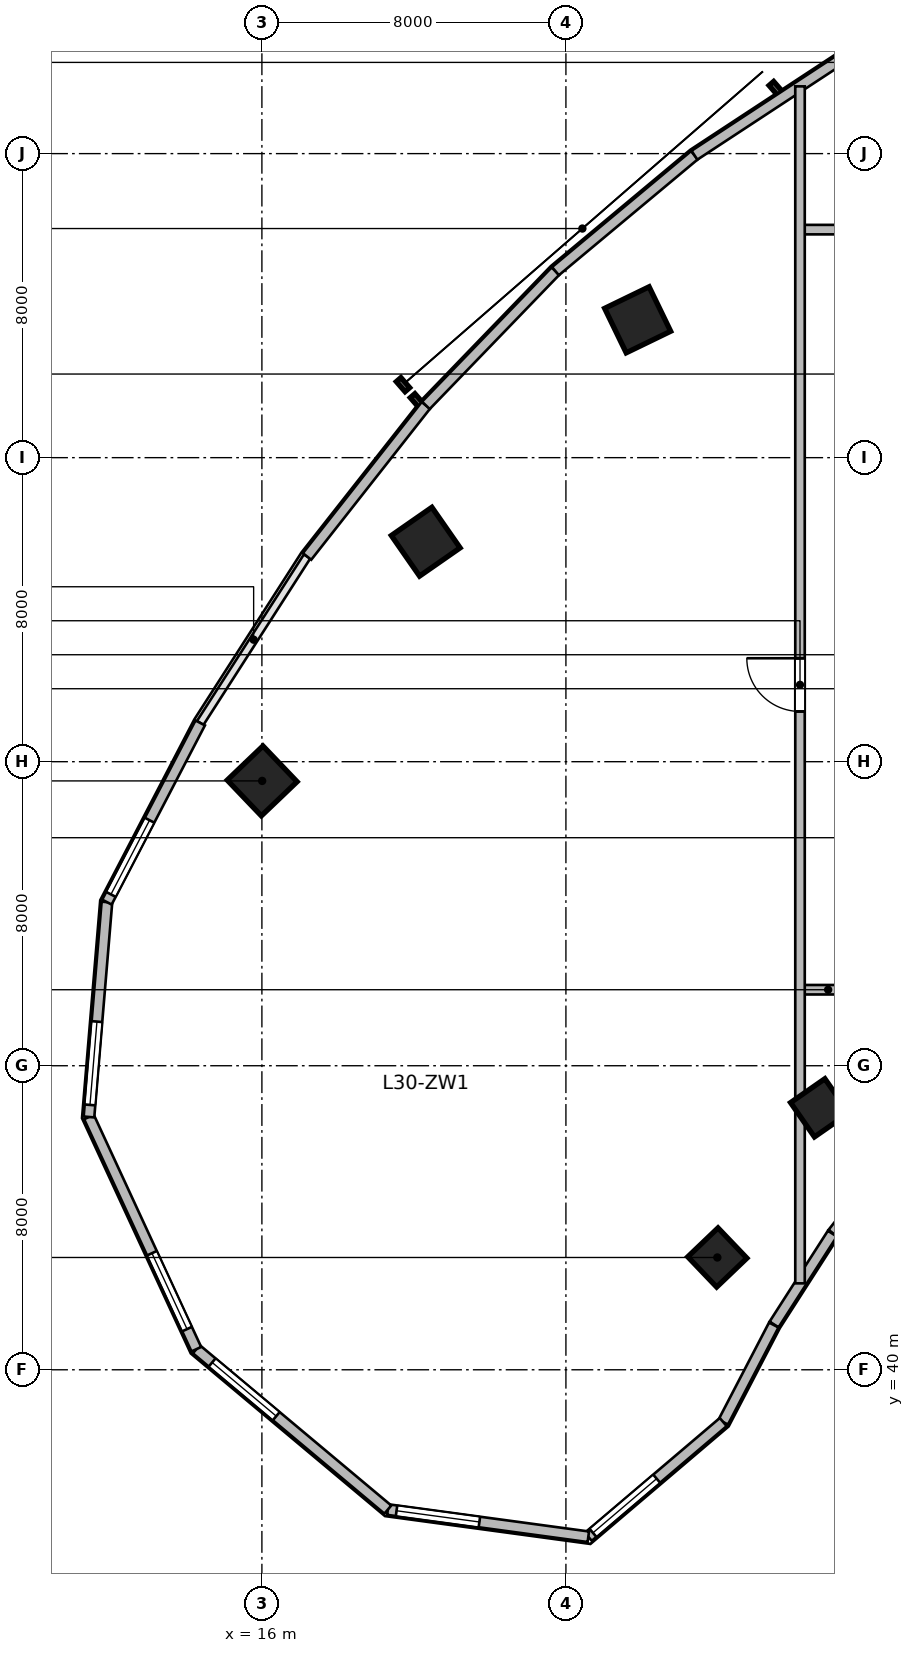
"""IFC4 building model, lengths in metres.
Left out: names, types, materials, properties, quantities, classifications, styles, units other than length and angle.
Written with IfcOpenShell. Run it as: python <this file> out.ifc"""

import sys

from ifc_helpers import new_model, si_unit, direction, frame, frame_2d, origin, origin_2d, place, context, subcontext, project, spatial, rectangle, extrude, source, transform, mapped, element, fill, save


model = new_model("IFC4")
c1 = context("Model", 3, precision=1e-05, world=origin(), true_north=direction((0.0, 1.0)))
c2 = subcontext(c1, "Body", "Model", "MODEL_VIEW")
j1 = project(units=[si_unit("LENGTHUNIT", "METRE"), si_unit("PLANEANGLEUNIT", "RADIAN")], contexts=[c1])
p1 = place(None, origin())
s1 = spatial("IfcSite", under=j1, at=p1, CompositionType="ELEMENT")
p2 = place(p1, origin())
s2 = spatial("IfcBuilding", under=s1, at=p2, CompositionType="ELEMENT")
p3 = place(p2, frame((0.0, 0.0, 127.2)))
s3 = spatial("IfcBuildingStorey", under=s2, at=p3, CompositionType="ELEMENT", Elevation=127.2)
m1 = source(origin(), c2, "Body", "SweptSolid", [
    extrude(rectangle(XDim=1.1, YDim=1.1, at=origin_2d()), origin(), (0.0, 0.0, 1.0), 3.9),
])
p4 = place(p3, frame((27.985, 42.955, 0.0), z_axis=(0.0, 0.0, 1.0), x_axis=(-0.690756218984, 0.723087716626, 0.0)))
e1 = element("IfcColumn", 1, at=p4, inside=s3, PredefinedType="COLUMN", context=c2, shape_type="MappedRepresentation", body=[
    mapped(m1, transform((0.0, 0.0, 0.0), scale=1.0)),
])
m2 = source(origin(), c2, "Body", "SweptSolid", [
    extrude(rectangle(XDim=1.3, YDim=1.3, at=origin_2d()), origin(), (0.0, 0.0, 1.0), 3.9),
])
p5 = place(p3, frame((16.007, 55.494, 0.0), z_axis=(0.0, 0.0, 1.0), x_axis=(-0.690756218984, 0.723087716626, 0.0)))
e2 = element("IfcColumn", 2, at=p5, inside=s3, PredefinedType="COLUMN", context=c2, shape_type="MappedRepresentation", body=[
    mapped(m2, transform((0.0, 0.0, 0.0), scale=1.0)),
])
p6 = place(p3, frame((30.677, 46.892, 0.0), z_axis=(0.0, 0.0, 1.0), x_axis=(-0.571143442153, 0.820850271661, 0.0)))
e3 = element("IfcColumn", 3, at=p6, inside=s3, PredefinedType="COLUMN", context=c2, shape_type="MappedRepresentation", body=[
    mapped(m1, transform((0.0, 0.0, 0.0), scale=1.0)),
])
for number, where, z_axis, x_axis in (
    (4, (20.311, 61.789, 0.0), (0.0, 0.0, 1.0), (-0.571, 0.821, 0.0)),
    (5, (25.888, 67.627, 0.0), (0.0, 0.0, 1.0), (-0.436, 0.9, 0.0)),
):
    element("IfcColumn", number, at=place(p3, frame(where, z_axis=z_axis, x_axis=x_axis)), inside=s3, PredefinedType="COLUMN", context=c2, shape_type="MappedRepresentation", body=[
        mapped(m2, transform((0.0, 0.0, 0.0), scale=1.0)),
    ])
m3 = source(origin(), c2, "Body", "SweptSolid", [
    extrude(rectangle(XDim=2.76, YDim=0.28, at=frame_2d((1.38, 0.0))), origin(), (0.0, 0.0, 1.0), 3.65),
])
p7 = place(p3, frame((32.728, 45.766, 0.0), z_axis=(0.0, 0.0, 1.0), x_axis=(-0.618180818641, -0.786035925047, 0.0)))
e6 = element("IfcWall", 6, at=p7, inside=s3, PredefinedType="SOLIDWALL", context=c2, shape_type="MappedRepresentation", body=[
    mapped(m3, transform((0.0, 0.0, 0.0), scale=1.0)),
])
m4 = source(origin(), c2, "Body", "SweptSolid", [
    extrude(rectangle(XDim=2.84, YDim=0.28, at=frame_2d((1.42, 0.0))), origin(), (0.0, 0.0, 1.0), 3.65),
])
p8 = place(p3, frame((31.011, 43.582, 0.0), z_axis=(0.0, 0.0, 1.0), x_axis=(-0.540214368057, -0.841527442538, 0.0)))
e7 = element("IfcWall", 7, at=p8, inside=s3, PredefinedType="SOLIDWALL", context=c2, shape_type="MappedRepresentation", body=[
    mapped(m4, transform((0.0, 0.0, 0.0), scale=1.0)),
])
m5 = source(origin(), c2, "Body", "SweptSolid", [
    extrude(rectangle(XDim=2.88, YDim=0.28, at=frame_2d((1.44, 0.0))), origin(), (0.0, 0.0, 1.0), 3.65),
])
p9 = place(p3, frame((29.469, 41.178, 0.0), z_axis=(0.0, 0.0, 1.0), x_axis=(-0.461769086658, -0.887000175088, 0.0)))
e8 = element("IfcWall", 8, at=p9, inside=s3, PredefinedType="SOLIDWALL", context=c2, shape_type="MappedRepresentation", body=[
    mapped(m5, transform((0.0, 0.0, 0.0), scale=1.0)),
])
m6 = source(origin(), c2, "Body", "SweptSolid", [
    extrude(rectangle(XDim=4.659, YDim=0.28, at=frame_2d((2.33, 0.0))), origin(), (0.0, 0.0, 1.0), 3.65),
])
p10 = place(p3, frame((28.139, 38.624, 0.0), z_axis=(0.0, 0.0, 1.0), x_axis=(-0.761913458795, -0.647678841176, 0.0)))
e9 = element("IfcWall", 9, at=p10, inside=s3, PredefinedType="SOLIDWALL", context=c2, shape_type="MappedRepresentation", body=[
    mapped(m6, transform((0.0, 0.0, 0.0), scale=1.0)),
])
p11 = place(p10, frame((2.299, 0.0, 0.95)))
e10 = element("IfcOpeningElement", 10, at=p11, cuts=e9, PredefinedType="OPENING", context=c2, shape_type="SweptSolid", body=[
    extrude(rectangle(XDim=2.2, YDim=2.1, at=frame_2d((1.1, 1.05))), frame((0.0, 0.15, 0.0), z_axis=(0.0, -1.0, 0.0), x_axis=(1.0, 0.0, 0.0)), (0.0, 0.0, 1.0), 0.3),
])
m7 = source(origin(), c2, "Body", "SweptSolid", [
    extrude(rectangle(XDim=5.324, YDim=0.28, at=frame_2d((2.662, 0.0))), origin(), (0.0, 0.0, 1.0), 3.65),
])
p12 = place(p3, frame((24.59, 35.606, 0.0), z_axis=(0.0, 0.0, 1.0), x_axis=(-0.990931467223, 0.134368252451, 0.0)))
e11 = element("IfcWall", 11, at=p12, inside=s3, PredefinedType="SOLIDWALL", context=c2, shape_type="MappedRepresentation", body=[
    mapped(m7, transform((0.0, 0.0, 0.0), scale=1.0)),
])
p13 = place(p12, frame((2.893, 0.0, 0.95)))
e12 = element("IfcOpeningElement", 12, at=p13, cuts=e11, PredefinedType="OPENING", context=c2, shape_type="SweptSolid", body=[
    extrude(rectangle(XDim=2.2, YDim=2.1, at=frame_2d((1.1, 1.05))), frame((0.0, 0.15, 0.0), z_axis=(0.0, -1.0, 0.0), x_axis=(1.0, 0.0, 0.0)), (0.0, 0.0, 1.0), 0.3),
])
m8 = source(origin(), c2, "Body", "SweptSolid", [
    extrude(rectangle(XDim=6.573, YDim=0.28, at=frame_2d((3.287, 0.0))), origin(), (0.0, 0.0, 1.0), 3.65),
])
p14 = place(p3, frame((19.314, 36.322, 0.0), z_axis=(0.0, 0.0, 1.0), x_axis=(-0.766715154163, 0.641987439423, 0.0)))
e13 = element("IfcWall", 13, at=p14, inside=s3, PredefinedType="SOLIDWALL", context=c2, shape_type="MappedRepresentation", body=[
    mapped(m8, transform((0.0, 0.0, 0.0), scale=1.0)),
])
p15 = place(p14, frame((3.83, 0.0, 0.95)))
e14 = element("IfcOpeningElement", 14, at=p15, cuts=e13, PredefinedType="OPENING", context=c2, shape_type="SweptSolid", body=[
    extrude(rectangle(XDim=2.2, YDim=2.1, at=frame_2d((1.1, 1.05))), frame((0.0, 0.15, 0.0), z_axis=(0.0, -1.0, 0.0), x_axis=(1.0, 0.0, 0.0)), (0.0, 0.0, 1.0), 0.3),
])
m9 = source(origin(), c2, "Body", "SweptSolid", [
    extrude(rectangle(XDim=6.732, YDim=0.28, at=frame_2d((3.366, 0.0))), origin(), (0.0, 0.0, 1.0), 3.65),
])
p16 = place(p3, frame((14.275, 40.541, 0.0), z_axis=(0.0, 0.0, 1.0), x_axis=(-0.419644552709, 0.907688520023, 0.0)))
e15 = element("IfcWall", 15, at=p16, inside=s3, PredefinedType="SOLIDWALL", context=c2, shape_type="MappedRepresentation", body=[
    mapped(m9, transform((0.0, 0.0, 0.0), scale=1.0)),
])
p17 = place(p16, frame((0.583, 0.0, 0.95)))
e16 = element("IfcOpeningElement", 16, at=p17, cuts=e15, PredefinedType="OPENING", context=c2, shape_type="SweptSolid", body=[
    extrude(rectangle(XDim=2.2, YDim=2.1, at=frame_2d((1.1, 1.05))), frame((0.0, 0.15, 0.0), z_axis=(0.0, -1.0, 0.0), x_axis=(1.0, 0.0, 0.0)), (0.0, 0.0, 1.0), 0.3),
])
m10 = source(origin(), c2, "Body", "SweptSolid", [
    extrude(rectangle(XDim=5.674, YDim=0.28, at=frame_2d((2.837, 0.0))), origin(), (0.0, 0.0, 1.0), 3.65),
])
p18 = place(p3, frame((11.45, 46.652, 0.0), z_axis=(0.0, 0.0, 1.0), x_axis=(0.083309007867, 0.996523762491, 0.0)))
e17 = element("IfcWall", 17, at=p18, inside=s3, PredefinedType="SOLIDWALL", context=c2, shape_type="MappedRepresentation", body=[
    mapped(m10, transform((0.0, 0.0, 0.0), scale=1.0)),
])
p19 = place(p18, frame((0.318, 0.0, 0.95)))
e18 = element("IfcOpeningElement", 18, at=p19, cuts=e17, PredefinedType="OPENING", context=c2, shape_type="SweptSolid", body=[
    extrude(rectangle(XDim=2.2, YDim=2.1, at=frame_2d((1.1, 1.05))), frame((0.0, 0.15, 0.0), z_axis=(0.0, -1.0, 0.0), x_axis=(1.0, 0.0, 0.0)), (0.0, 0.0, 1.0), 0.3),
])
m11 = source(origin(), c2, "Body", "SweptSolid", [
    extrude(rectangle(XDim=5.315, YDim=0.28, at=frame_2d((2.658, 0.0))), origin(), (0.0, 0.0, 1.0), 3.65),
])
p20 = place(p3, frame((11.922, 52.305, 0.0), z_axis=(0.0, 0.0, 1.0), x_axis=(0.461760527822, 0.887004630735, 0.0)))
e19 = element("IfcWall", 19, at=p20, inside=s3, PredefinedType="SOLIDWALL", context=c2, shape_type="MappedRepresentation", body=[
    mapped(m11, transform((0.0, 0.0, 0.0), scale=1.0)),
])
p21 = place(p20, frame((0.229, 0.0, 0.95)))
e20 = element("IfcOpeningElement", 20, at=p21, cuts=e19, PredefinedType="OPENING", context=c2, shape_type="SweptSolid", body=[
    extrude(rectangle(XDim=2.2, YDim=2.1, at=frame_2d((1.1, 1.05))), frame((0.0, 0.15, 0.0), z_axis=(0.0, -1.0, 0.0), x_axis=(1.0, 0.0, 0.0)), (0.0, 0.0, 1.0), 0.3),
])
m12 = source(origin(), c2, "Body", "SweptSolid", [
    extrude(rectangle(XDim=5.058, YDim=0.28, at=frame_2d((2.529, 0.0))), origin(), (0.0, 0.0, 1.0), 3.65),
])
p22 = place(p3, frame((17.188, 61.4, 0.0), z_axis=(0.0, 0.0, 1.0), x_axis=(0.618145507434, 0.786063694391, 0.0)))
e21 = element("IfcWall", 21, at=p22, inside=s3, PredefinedType="SOLIDWALL", context=c2, shape_type="MappedRepresentation", body=[
    mapped(m12, transform((0.0, 0.0, 0.0), scale=1.0)),
])
m13 = source(origin(), c2, "Body", "SweptSolid", [
    extrude(rectangle(XDim=4.908, YDim=0.28, at=frame_2d((2.454, 0.0))), origin(), (0.0, 0.0, 1.0), 3.65),
])
p23 = place(p3, frame((20.315, 65.376, 0.0), z_axis=(0.0, 0.0, 1.0), x_axis=(0.694613154328, 0.719383462302, 0.0)))
e22 = element("IfcWall", 22, at=p23, inside=s3, PredefinedType="SOLIDWALL", context=c2, shape_type="MappedRepresentation", body=[
    mapped(m13, transform((0.0, 0.0, 0.0), scale=1.0)),
])
m14 = source(origin(), c2, "Body", "SweptSolid", [
    extrude(rectangle(XDim=4.762, YDim=0.28, at=frame_2d((2.381, 0.0))), origin(), (0.0, 0.0, 1.0), 3.65),
])
p24 = place(p3, frame((23.725, 68.907, 0.0), z_axis=(0.0, 0.0, 1.0), x_axis=(0.767952279762, 0.640507061638, 0.0)))
e23 = element("IfcWall", 23, at=p24, inside=s3, PredefinedType="SOLIDWALL", context=c2, shape_type="MappedRepresentation", body=[
    mapped(m14, transform((0.0, 0.0, 0.0), scale=1.0)),
])
m15 = source(origin(), c2, "Body", "SweptSolid", [
    extrude(rectangle(XDim=4.626, YDim=0.28, at=frame_2d((2.313, 0.0))), origin(), (0.0, 0.0, 1.0), 3.65),
])
p25 = place(p3, frame((27.382, 71.958, 0.0), z_axis=(0.0, 0.0, 1.0), x_axis=(0.83595938331, 0.548791316855, 0.0)))
e24 = element("IfcWall", 24, at=p25, inside=s3, PredefinedType="SOLIDWALL", context=c2, shape_type="MappedRepresentation", body=[
    mapped(m15, transform((0.0, 0.0, 0.0), scale=1.0)),
])
m16 = source(origin(), c2, "Body", "SweptSolid", [
    extrude(rectangle(XDim=2.5, YDim=0.25, at=frame_2d((1.25, 0.0))), origin(), (0.0, 0.0, 1.0), 3.65),
])
for number, where, z_axis, x_axis in (
    (25, (30.2, 50.0, 0.0), (0.0, 0.0, 1.0), (1.0, 0.0, 0.0)),
    (26, (30.2, 70.0, 0.0), (0.0, 0.0, 1.0), (1.0, 0.0, 0.0)),
):
    element("IfcWall", number, at=place(p3, frame(where, z_axis=z_axis, x_axis=x_axis)), inside=s3, PredefinedType="PARTITIONING", context=c2, shape_type="MappedRepresentation", body=[
        mapped(m16, transform((0.0, 0.0, 0.0), scale=1.0)),
    ])
m17 = source(origin(), c2, "Body", "SweptSolid", [
    extrude(rectangle(XDim=31.495, YDim=0.25, at=frame_2d((15.748, 0.0))), origin(), (0.0, 0.0, 1.0), 2.942),
])
p26 = place(p3, frame((30.16, 42.274, 0.0), z_axis=(0.0, 0.0, 1.0), x_axis=(0.0, 1.0, 0.0)))
e27 = element("IfcWall", 27, at=p26, inside=s3, PredefinedType="PARTITIONING", context=c2, shape_type="MappedRepresentation", body=[
    mapped(m17, transform((0.0, 0.0, 0.0), scale=1.0)),
])
p27 = place(p26, frame((15.048, 0.0, 0.0)))
e28 = element("IfcOpeningElement", 28, at=p27, cuts=e27, PredefinedType="OPENING", context=c2, shape_type="SweptSolid", body=[
    extrude(rectangle(XDim=1.4, YDim=2.15, at=frame_2d((0.7, 1.075))), frame((0.0, 0.135, 0.0), z_axis=(0.0, -1.0, 0.0), x_axis=(1.0, 0.0, 0.0)), (0.0, 0.0, 1.0), 0.27),
])
m18 = source(origin(), c2, "Body", "SweptSolid", [
    extrude(rectangle(XDim=2.2, YDim=2.1, at=frame_2d((1.1, 1.05))), frame((0.0, 0.03, 0.0), z_axis=(0.0, -1.0, 0.0), x_axis=(1.0, 0.0, 0.0)), (0.0, 0.0, 1.0), 0.06),
])
p28 = place(p11, origin())
e29 = element("IfcWindow", 29, at=p28, inside=s3, PartitioningType="TRIPLE_PANEL_VERTICAL", PredefinedType="WINDOW", context=c2, shape_type="MappedRepresentation", body=[
    mapped(m18, transform((0.0, 0.0, 0.0), scale=1.0)),
])
fill(e10, e29)
p29 = place(p13, origin())
e30 = element("IfcWindow", 30, at=p29, inside=s3, PartitioningType="TRIPLE_PANEL_VERTICAL", PredefinedType="WINDOW", context=c2, shape_type="MappedRepresentation", body=[
    mapped(m18, transform((0.0, 0.0, 0.0), scale=1.0)),
])
fill(e12, e30)
p30 = place(p15, origin())
e31 = element("IfcWindow", 31, at=p30, inside=s3, PartitioningType="TRIPLE_PANEL_VERTICAL", PredefinedType="WINDOW", context=c2, shape_type="MappedRepresentation", body=[
    mapped(m18, transform((0.0, 0.0, 0.0), scale=1.0)),
])
fill(e14, e31)
p31 = place(p17, origin())
e32 = element("IfcWindow", 32, at=p31, inside=s3, PartitioningType="TRIPLE_PANEL_VERTICAL", PredefinedType="WINDOW", context=c2, shape_type="MappedRepresentation", body=[
    mapped(m18, transform((0.0, 0.0, 0.0), scale=1.0)),
])
fill(e16, e32)
p32 = place(p19, origin())
e33 = element("IfcWindow", 33, at=p32, inside=s3, PartitioningType="TRIPLE_PANEL_VERTICAL", PredefinedType="WINDOW", context=c2, shape_type="MappedRepresentation", body=[
    mapped(m18, transform((0.0, 0.0, 0.0), scale=1.0)),
])
fill(e18, e33)
p33 = place(p21, origin())
e34 = element("IfcWindow", 34, at=p33, inside=s3, PartitioningType="TRIPLE_PANEL_VERTICAL", PredefinedType="WINDOW", context=c2, shape_type="MappedRepresentation", body=[
    mapped(m18, transform((0.0, 0.0, 0.0), scale=1.0)),
])
fill(e20, e34)
m19 = source(origin(), c2, "Body", "SweptSolid", [
    extrude(rectangle(XDim=1.4, YDim=2.15, at=frame_2d((0.7, 1.075))), frame((0.0, 0.025, 0.0), z_axis=(0.0, -1.0, 0.0), x_axis=(1.0, 0.0, 0.0)), (0.0, 0.0, 1.0), 0.05),
])
p34 = place(p27, origin())
e35 = element("IfcDoor", 35, at=p34, inside=s3, OperationType="SINGLE_SWING_RIGHT", PredefinedType="DOOR", context=c2, shape_type="MappedRepresentation", body=[
    mapped(m19, transform((0.0, 0.0, 0.0), scale=1.0)),
])
fill(e28, e35)
save(model, sys.argv[1])
